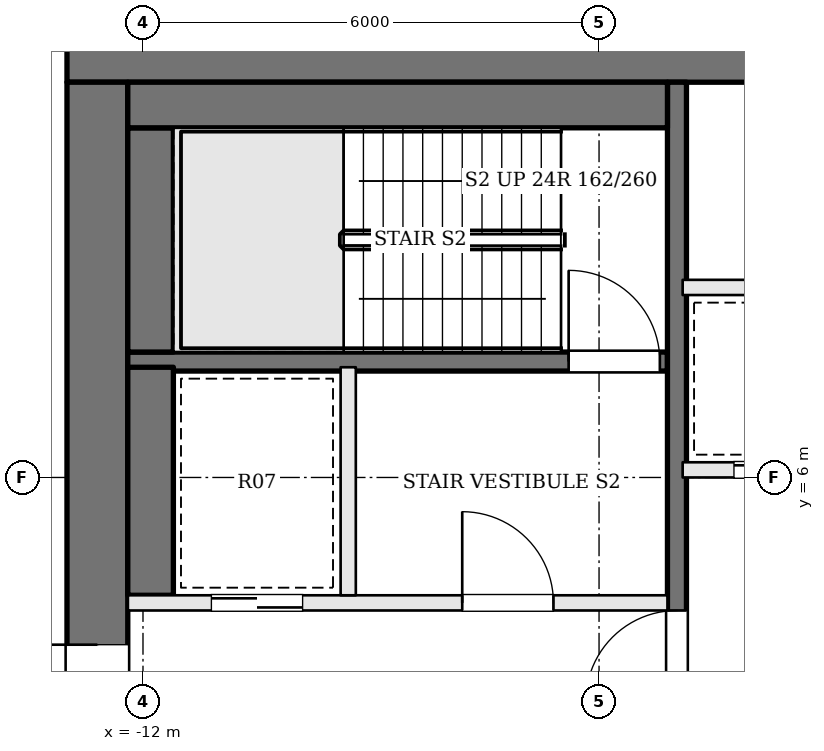
"""IFC4 building model, lengths in metres.
Left out: names, types, materials, properties, quantities, classifications, styles, units other than length and angle.
Written with IfcOpenShell. Run it as: python <this file> out.ifc"""

import sys

from ifc_helpers import new_model, si_unit, direction, frame, frame_2d, origin, place, context, subcontext, project, spatial, rectangle, extrude, element, fill, save


model = new_model("IFC4")
c1 = context("Model", 3, precision=1e-05, world=origin(), true_north=direction((0.0, 1.0)))
c2 = subcontext(c1, "Body", "Model", "MODEL_VIEW")
j1 = project(units=[si_unit("LENGTHUNIT", "METRE"), si_unit("PLANEANGLEUNIT", "RADIAN")], contexts=[c1])
p1 = place(None, origin())
s1 = spatial("IfcSite", under=j1, at=p1, CompositionType="ELEMENT")
p2 = place(p1, origin())
s2 = spatial("IfcBuilding", under=s1, at=p2, CompositionType="ELEMENT")
p3 = place(p2, frame((0.0, 0.0, 292.2)))
s3 = spatial("IfcBuildingStorey", under=s2, at=p3, CompositionType="ELEMENT", Elevation=292.2)
p4 = place(p3, frame((-13.0, 11.6, 0.0), z_axis=(0.0, 0.0, 1.0), x_axis=(1.0, 0.0, 0.0)))
e1 = element("IfcWall", 1, at=p4, inside=s3, PredefinedType="SHEAR", context=c2, shape_type="SweptSolid", body=[
    extrude(rectangle(XDim=26.0, YDim=0.8, at=frame_2d((13.0, 0.0))), origin(), (0.0, 0.0, 1.0), 3.9),
])
p5 = place(p4, frame((9.65, 0.0, 0.0)))
e2 = element("IfcOpeningElement", 2, at=p5, cuts=e1, PredefinedType="OPENING", context=c2, shape_type="SweptSolid", body=[
    extrude(rectangle(XDim=1.0, YDim=2.1, at=frame_2d((0.5, 1.05))), frame((0.0, 0.41, 0.0), z_axis=(0.0, -1.0, 0.0), x_axis=(1.0, 0.0, 0.0)), (0.0, 0.0, 1.0), 0.82),
])
p6 = place(p4, frame((12.675, 0.0, 0.0)))
e3 = element("IfcOpeningElement", 3, at=p6, cuts=e1, PredefinedType="OPENING", context=c2, shape_type="SweptSolid", body=[
    extrude(rectangle(XDim=0.7, YDim=2.1, at=frame_2d((0.35, 1.05))), frame((0.0, 0.41, 0.0), z_axis=(0.0, -1.0, 0.0), x_axis=(1.0, 0.0, 0.0)), (0.0, 0.0, 1.0), 0.82),
])
p7 = place(p4, frame((14.725, 0.0, 0.0)))
e4 = element("IfcOpeningElement", 4, at=p7, cuts=e1, PredefinedType="OPENING", context=c2, shape_type="SweptSolid", body=[
    extrude(rectangle(XDim=0.7, YDim=2.1, at=frame_2d((0.35, 1.05))), frame((0.0, 0.41, 0.0), z_axis=(0.0, -1.0, 0.0), x_axis=(1.0, 0.0, 0.0)), (0.0, 0.0, 1.0), 0.82),
])
p8 = place(p4, frame((16.6, 0.0, 0.0)))
e5 = element("IfcOpeningElement", 5, at=p8, cuts=e1, PredefinedType="OPENING", context=c2, shape_type="SweptSolid", body=[
    extrude(rectangle(XDim=1.0, YDim=2.1, at=frame_2d((0.5, 1.05))), frame((0.0, 0.41, 0.0), z_axis=(0.0, -1.0, 0.0), x_axis=(1.0, 0.0, 0.0)), (0.0, 0.0, 1.0), 0.82),
])
p9 = place(p3, frame((-12.6, -2.2, 0.0), z_axis=(0.0, 0.0, 1.0), x_axis=(0.0, 1.0, 0.0)))
e6 = element("IfcWall", 6, at=p9, inside=s3, PredefinedType="SHEAR", context=c2, shape_type="SweptSolid", body=[
    extrude(rectangle(XDim=13.4, YDim=0.8, at=frame_2d((6.7, 0.0))), origin(), (0.0, 0.0, 1.0), 3.9),
])
p10 = place(p9, frame((4.2, 0.0, 0.0)))
e7 = element("IfcOpeningElement", 7, at=p10, cuts=e6, PredefinedType="OPENING", context=c2, shape_type="SweptSolid", body=[
    extrude(rectangle(XDim=1.8, YDim=2.1, at=frame_2d((0.9, 1.05))), frame((0.0, 0.41, 0.0), z_axis=(0.0, -1.0, 0.0), x_axis=(1.0, 0.0, 0.0)), (0.0, 0.0, 1.0), 0.82),
])
p11 = place(p3, frame((-12.2, 4.35, 0.0), z_axis=(0.0, 0.0, 1.0), x_axis=(1.0, 0.0, 0.0)))
e8 = element("IfcWall", 8, at=p11, inside=s3, PredefinedType="SOLIDWALL", context=c2, shape_type="SweptSolid", body=[
    extrude(rectangle(XDim=7.1, YDim=0.2, at=frame_2d((3.55, 0.0))), origin(), (0.0, 0.0, 1.0), 3.7),
])
p12 = place(p11, frame((4.4, 0.0, 0.0)))
e9 = element("IfcOpeningElement", 9, at=p12, cuts=e8, PredefinedType="OPENING", context=c2, shape_type="SweptSolid", body=[
    extrude(rectangle(XDim=1.2, YDim=2.1, at=frame_2d((0.6, 1.05))), frame((0.0, 0.11, 0.0), z_axis=(0.0, -1.0, 0.0), x_axis=(1.0, 0.0, 0.0)), (0.0, 0.0, 1.0), 0.22),
])
p13 = place(p11, frame((1.1, 0.0, 0.0)))
e10 = element("IfcOpeningElement", 10, at=p13, cuts=e8, PredefinedType="OPENING", context=c2, shape_type="SweptSolid", body=[
    extrude(rectangle(XDim=1.2, YDim=2.1, at=frame_2d((0.6, 1.05))), frame((0.0, 0.11, 0.0), z_axis=(0.0, -1.0, 0.0), x_axis=(1.0, 0.0, 0.0)), (0.0, 0.0, 1.0), 0.22),
])
p14 = place(p3, frame((-12.2, 7.525, 0.0), z_axis=(0.0, 0.0, 1.0), x_axis=(1.0, 0.0, 0.0)))
e11 = element("IfcWall", 11, at=p14, inside=s3, PredefinedType="SOLIDWALL", context=c2, shape_type="SweptSolid", body=[
    extrude(rectangle(XDim=7.1, YDim=0.25, at=frame_2d((3.55, 0.0))), origin(), (0.0, 0.0, 1.0), 3.7),
])
p15 = place(p14, frame((5.8, 0.0, 0.0)))
e12 = element("IfcOpeningElement", 12, at=p15, cuts=e11, PredefinedType="OPENING", context=c2, shape_type="SweptSolid", body=[
    extrude(rectangle(XDim=1.2, YDim=2.1, at=frame_2d((0.6, 1.05))), frame((0.0, 0.135, 0.0), z_axis=(0.0, -1.0, 0.0), x_axis=(1.0, 0.0, 0.0)), (0.0, 0.0, 1.0), 0.27),
])
p16 = place(p3, frame((-9.3, 4.45, 0.0), z_axis=(0.0, 0.0, 1.0), x_axis=(0.0, 1.0, 0.0)))
e13 = element("IfcWall", 13, at=p16, inside=s3, PredefinedType="SOLIDWALL", context=c2, shape_type="SweptSolid", body=[
    extrude(rectangle(XDim=3.0, YDim=0.2, at=frame_2d((1.5, 0.0))), origin(), (0.0, 0.0, 1.0), 3.7),
])
p17 = place(p3, frame((-4.975, -2.2, 0.0), z_axis=(0.0, 0.0, 1.0), x_axis=(0.0, 1.0, 0.0)))
e14 = element("IfcWall", 14, at=p17, inside=s3, PredefinedType="SOLIDWALL", context=c2, shape_type="SweptSolid", body=[
    extrude(rectangle(XDim=13.4, YDim=0.25, at=frame_2d((6.7, 0.0))), origin(), (0.0, 0.0, 1.0), 3.7),
])
p18 = place(p17, frame((5.25, 0.0, 0.0)))
e15 = element("IfcOpeningElement", 15, at=p18, cuts=e14, PredefinedType="OPENING", context=c2, shape_type="SweptSolid", body=[
    extrude(rectangle(XDim=1.2, YDim=2.1, at=frame_2d((0.6, 1.05))), frame((0.0, 0.135, 0.0), z_axis=(0.0, -1.0, 0.0), x_axis=(1.0, 0.0, 0.0)), (0.0, 0.0, 1.0), 0.27),
])
p19 = place(p3, frame((-11.9, 4.45, 0.0), z_axis=(0.0, 0.0, 1.0), x_axis=(0.0, 1.0, 0.0)))
e16 = element("IfcWall", 16, at=p19, inside=s3, PredefinedType="SOLIDWALL", context=c2, shape_type="SweptSolid", body=[
    extrude(rectangle(XDim=3.0, YDim=0.6, at=frame_2d((1.5, 0.0))), origin(), (0.0, 0.0, 1.0), 3.7),
])
p20 = place(p3, frame((-11.9, 7.65, 0.0), z_axis=(0.0, 0.0, 1.0), x_axis=(0.0, 1.0, 0.0)))
e17 = element("IfcWall", 17, at=p20, inside=s3, PredefinedType="SOLIDWALL", context=c2, shape_type="SweptSolid", body=[
    extrude(rectangle(XDim=2.95, YDim=0.6, at=frame_2d((1.475, 0.0))), origin(), (0.0, 0.0, 1.0), 3.7),
])
p21 = place(p3, frame((-12.2, 10.9, 0.0), z_axis=(0.0, 0.0, 1.0), x_axis=(1.0, 0.0, 0.0)))
e18 = element("IfcWall", 18, at=p21, inside=s3, PredefinedType="SOLIDWALL", context=c2, shape_type="SweptSolid", body=[
    extrude(rectangle(XDim=7.1, YDim=0.6, at=frame_2d((3.55, 0.0))), origin(), (0.0, 0.0, 1.0), 3.7),
])
p22 = place(p3, frame((-4.9, 6.1, 0.0), z_axis=(0.0, 0.0, 1.0), x_axis=(1.0, 0.0, 0.0)))
e19 = element("IfcWall", 19, at=p22, inside=s3, PredefinedType="SOLIDWALL", context=c2, shape_type="SweptSolid", body=[
    extrude(rectangle(XDim=9.8, YDim=0.2, at=frame_2d((4.9, 0.0))), origin(), (0.0, 0.0, 1.0), 3.7),
])
p23 = place(p22, frame((0.675, 0.0, 0.0)))
e20 = element("IfcOpeningElement", 20, at=p23, cuts=e19, PredefinedType="OPENING", context=c2, shape_type="SweptSolid", body=[
    extrude(rectangle(XDim=1.1, YDim=2.1, at=frame_2d((0.55, 1.05))), frame((0.0, 0.11, 0.0), z_axis=(0.0, -1.0, 0.0), x_axis=(1.0, 0.0, 0.0)), (0.0, 0.0, 1.0), 0.22),
])
p24 = place(p22, frame((3.125, 0.0, 0.0)))
e21 = element("IfcOpeningElement", 21, at=p24, cuts=e19, PredefinedType="OPENING", context=c2, shape_type="SweptSolid", body=[
    extrude(rectangle(XDim=1.1, YDim=2.1, at=frame_2d((0.55, 1.05))), frame((0.0, 0.11, 0.0), z_axis=(0.0, -1.0, 0.0), x_axis=(1.0, 0.0, 0.0)), (0.0, 0.0, 1.0), 0.22),
])
p25 = place(p22, frame((5.575, 0.0, 0.0)))
e22 = element("IfcOpeningElement", 22, at=p25, cuts=e19, PredefinedType="OPENING", context=c2, shape_type="SweptSolid", body=[
    extrude(rectangle(XDim=1.1, YDim=2.1, at=frame_2d((0.55, 1.05))), frame((0.0, 0.11, 0.0), z_axis=(0.0, -1.0, 0.0), x_axis=(1.0, 0.0, 0.0)), (0.0, 0.0, 1.0), 0.22),
])
p26 = place(p22, frame((8.025, 0.0, 0.0)))
e23 = element("IfcOpeningElement", 23, at=p26, cuts=e19, PredefinedType="OPENING", context=c2, shape_type="SweptSolid", body=[
    extrude(rectangle(XDim=1.1, YDim=2.1, at=frame_2d((0.55, 1.05))), frame((0.0, 0.11, 0.0), z_axis=(0.0, -1.0, 0.0), x_axis=(1.0, 0.0, 0.0)), (0.0, 0.0, 1.0), 0.22),
])
p27 = place(p3, frame((-4.9, 8.5, 0.0), z_axis=(0.0, 0.0, 1.0), x_axis=(1.0, 0.0, 0.0)))
e24 = element("IfcWall", 24, at=p27, inside=s3, PredefinedType="SOLIDWALL", context=c2, shape_type="SweptSolid", body=[
    extrude(rectangle(XDim=9.8, YDim=0.2, at=frame_2d((4.9, 0.0))), origin(), (0.0, 0.0, 1.0), 3.7),
])
p28 = place(p10, origin())
e25 = element("IfcDoor", 25, at=p28, inside=s3, OperationType="DOUBLE_DOOR_SINGLE_SWING", PredefinedType="DOOR", context=c2, shape_type="SweptSolid", body=[
    extrude(rectangle(XDim=1.8, YDim=2.1, at=frame_2d((0.9, 1.05))), frame((0.0, 0.025, 0.0), z_axis=(0.0, -1.0, 0.0), x_axis=(1.0, 0.0, 0.0)), (0.0, 0.0, 1.0), 0.05),
])
fill(e7, e25)
p29 = place(p18, origin())
e26 = element("IfcDoor", 26, at=p29, inside=s3, OperationType="SINGLE_SWING_LEFT", PredefinedType="DOOR", context=c2, shape_type="SweptSolid", body=[
    extrude(rectangle(XDim=1.2, YDim=2.1, at=frame_2d((0.6, 1.05))), frame((0.0, 0.025, 0.0), z_axis=(0.0, -1.0, 0.0), x_axis=(1.0, 0.0, 0.0)), (0.0, 0.0, 1.0), 0.05),
])
fill(e15, e26)
p30 = place(p12, origin())
e27 = element("IfcDoor", 27, at=p30, inside=s3, OperationType="SINGLE_SWING_LEFT", PredefinedType="DOOR", context=c2, shape_type="SweptSolid", body=[
    extrude(rectangle(XDim=1.2, YDim=2.1, at=frame_2d((0.6, 1.05))), frame((0.0, 0.025, 0.0), z_axis=(0.0, -1.0, 0.0), x_axis=(1.0, 0.0, 0.0)), (0.0, 0.0, 1.0), 0.05),
])
fill(e9, e27)
p31 = place(p15, origin())
e28 = element("IfcDoor", 28, at=p31, inside=s3, OperationType="SINGLE_SWING_LEFT", PredefinedType="DOOR", context=c2, shape_type="SweptSolid", body=[
    extrude(rectangle(XDim=1.2, YDim=2.1, at=frame_2d((0.6, 1.05))), frame((0.0, 0.025, 0.0), z_axis=(0.0, -1.0, 0.0), x_axis=(1.0, 0.0, 0.0)), (0.0, 0.0, 1.0), 0.05),
])
fill(e12, e28)
p32 = place(p13, origin())
e29 = element("IfcDoor", 29, at=p32, inside=s3, OperationType="SLIDING_TO_RIGHT", PredefinedType="DOOR", context=c2, shape_type="SweptSolid", body=[
    extrude(rectangle(XDim=1.2, YDim=2.1, at=frame_2d((0.6, 1.05))), frame((0.0, 0.025, 0.0), z_axis=(0.0, -1.0, 0.0), x_axis=(1.0, 0.0, 0.0)), (0.0, 0.0, 1.0), 0.05),
])
fill(e10, e29)
p33 = place(p23, origin())
e30 = element("IfcDoor", 30, at=p33, inside=s3, OperationType="SLIDING_TO_RIGHT", PredefinedType="DOOR", context=c2, shape_type="SweptSolid", body=[
    extrude(rectangle(XDim=1.1, YDim=2.1, at=frame_2d((0.55, 1.05))), frame((0.0, 0.025, 0.0), z_axis=(0.0, -1.0, 0.0), x_axis=(1.0, 0.0, 0.0)), (0.0, 0.0, 1.0), 0.05),
])
fill(e20, e30)
save(model, sys.argv[1])
